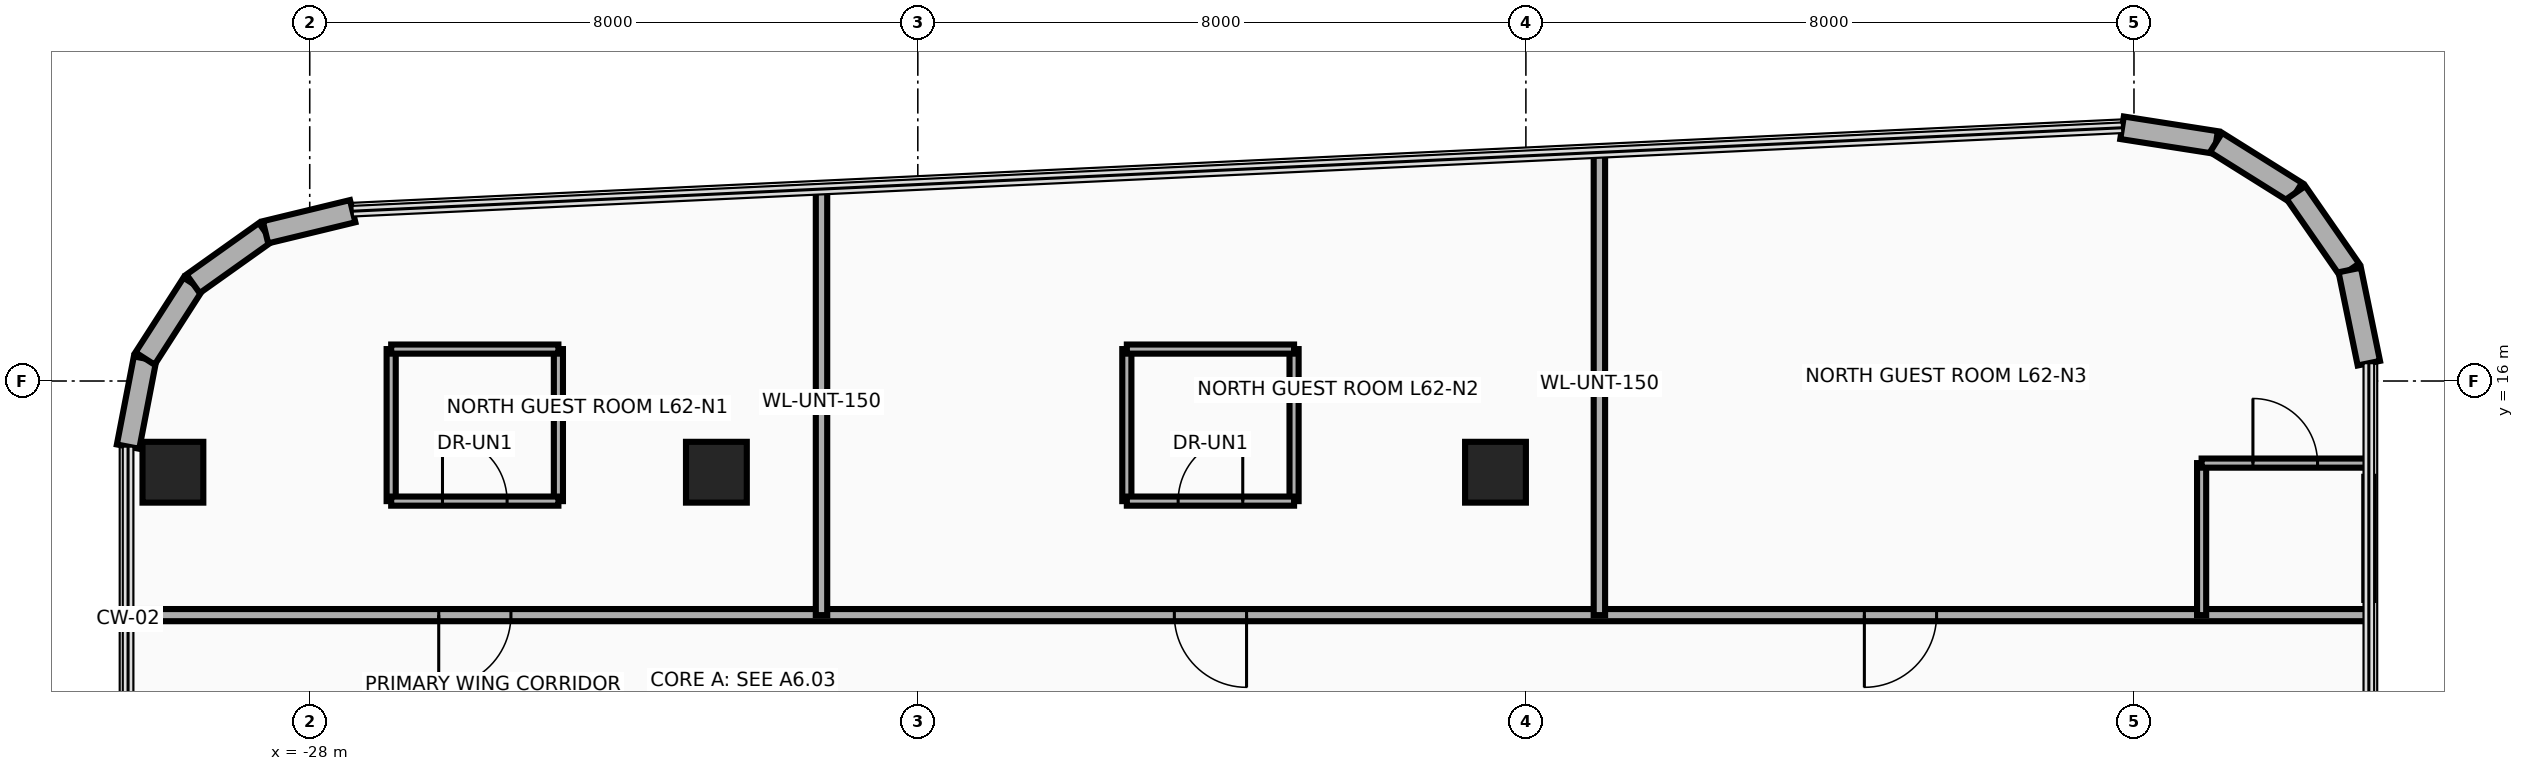
"""IFC4 building model, lengths in metres.
Left out: names, types, materials, properties, quantities, classifications, styles, units other than length and angle.
Written with IfcOpenShell. Run it as: python <this file> out.ifc"""

import sys

from ifc_helpers import new_model, si_unit, direction, frame, frame_2d, origin, origin_2d, place, context, subcontext, project, spatial, rectangle, extrude, source, transform, mapped, element, fill, save


model = new_model("IFC4")
c1 = context("Model", 3, precision=1e-05, world=origin(), true_north=direction((0.0, 1.0)))
c2 = subcontext(c1, "Body", "Model", "MODEL_VIEW")
j1 = project(units=[si_unit("LENGTHUNIT", "METRE"), si_unit("PLANEANGLEUNIT", "RADIAN")], contexts=[c1])
p1 = place(None, origin())
s1 = spatial("IfcSite", under=j1, at=p1, CompositionType="ELEMENT")
p2 = place(p1, origin())
s2 = spatial("IfcBuilding", under=s1, at=p2, CompositionType="ELEMENT")
p3 = place(p2, frame((0.0, 0.0, 240.5)))
s3 = spatial("IfcBuildingStorey", under=s2, at=p3, CompositionType="ELEMENT", Elevation=240.5)
m1 = source(origin(), c2, "Body", "SweptSolid", [
    extrude(rectangle(XDim=0.8, YDim=0.8, at=origin_2d()), origin(), (0.0, 0.0, 1.0), 3.5),
])
for number, where, z_axis, x_axis in (
    (1, (-29.8, 14.8, 0.0), (0.0, 0.0, 1.0), (1.0, 0.0, 0.0)),
    (2, (-22.65, 14.8, 0.0), (0.0, 0.0, 1.0), (1.0, 0.0, 0.0)),
    (3, (-12.4, 14.8, 0.0), (0.0, 0.0, 1.0), (1.0, 0.0, 0.0)),
):
    element("IfcColumn", number, at=place(p3, frame(where, z_axis=z_axis, x_axis=x_axis)), inside=s3, PredefinedType="COLUMN", context=c2, shape_type="MappedRepresentation", body=[
        mapped(m1, transform((0.0, 0.0, 0.0), x_axis=(1.0, 0.0, 0.0), y_axis=(0.0, 1.0, 0.0), z_axis=(0.0, 0.0, 1.0), scale=1.0)),
    ])
p4 = place(p3, frame((-30.39, 15.137, 0.0), z_axis=(0.0, 0.0, 1.0), x_axis=(0.189307792679, 0.981917796779, 0.0)))
e4 = element("IfcWall", 4, at=p4, inside=s3, PredefinedType="SOLIDWALL", context=c2, shape_type="SweptSolid", body=[
    extrude(rectangle(XDim=1.18, YDim=0.3, at=frame_2d((0.59, 0.0))), origin(), (0.0, 0.0, 1.0), 3.26),
])
p5 = place(p3, frame((-30.167, 16.295, 0.0), z_axis=(0.0, 0.0, 1.0), x_axis=(0.540842020947, 0.841124193195, 0.0)))
e5 = element("IfcWall", 5, at=p5, inside=s3, PredefinedType="SOLIDWALL", context=c2, shape_type="SweptSolid", body=[
    extrude(rectangle(XDim=1.169, YDim=0.3, at=frame_2d((0.584, 0.0))), origin(), (0.0, 0.0, 1.0), 3.26),
])
p6 = place(p3, frame((-29.534, 17.279, 0.0), z_axis=(0.0, 0.0, 1.0), x_axis=(0.81466371606, 0.579933642527, 0.0)))
e6 = element("IfcWall", 6, at=p6, inside=s3, PredefinedType="SOLIDWALL", context=c2, shape_type="SweptSolid", body=[
    extrude(rectangle(XDim=1.169, YDim=0.3, at=frame_2d((0.584, 0.0))), origin(), (0.0, 0.0, 1.0), 3.26),
])
p7 = place(p3, frame((-28.582, 17.957, 0.0), z_axis=(0.0, 0.0, 1.0), x_axis=(0.971929016595, 0.235274279725, 0.0)))
e7 = element("IfcWall", 7, at=p7, inside=s3, PredefinedType="SOLIDWALL", context=c2, shape_type="SweptSolid", body=[
    extrude(rectangle(XDim=1.18, YDim=0.3, at=frame_2d((0.59, 0.0))), origin(), (0.0, 0.0, 1.0), 3.26),
])
p8 = place(p3, frame((-4.157, 19.332, 0.0), z_axis=(0.0, 0.0, 1.0), x_axis=(0.987969236552, -0.15465053387, 0.0)))
e8 = element("IfcWall", 8, at=p8, inside=s3, PredefinedType="SOLIDWALL", context=c2, shape_type="SweptSolid", body=[
    extrude(rectangle(XDim=1.252, YDim=0.3, at=frame_2d((0.626, 0.0))), origin(), (0.0, 0.0, 1.0), 3.26),
])
for number, where, z_axis, x_axis in (
    (9, (-2.92, 19.138, 0.0), (0.0, 0.0, 1.0), (0.847, -0.531, 0.0)),
    (10, (-1.869, 18.48, 0.0), (0.0, 0.0, 1.0), (0.57, -0.822, 0.0)),
):
    element("IfcWall", number, at=place(p3, frame(where, z_axis=z_axis, x_axis=x_axis)), inside=s3, PredefinedType="SOLIDWALL", context=c2, shape_type="SweptSolid", body=[
        extrude(rectangle(XDim=1.24, YDim=0.3, at=frame_2d((0.62, 0.0))), origin(), (0.0, 0.0, 1.0), 3.26),
    ])
p9 = place(p3, frame((-1.161, 17.461, 0.0), z_axis=(0.0, 0.0, 1.0), x_axis=(0.20087696073, -0.979616479367, 0.0)))
e11 = element("IfcWall", 11, at=p9, inside=s3, PredefinedType="SOLIDWALL", context=c2, shape_type="SweptSolid", body=[
    extrude(rectangle(XDim=1.252, YDim=0.3, at=frame_2d((0.626, 0.0))), origin(), (0.0, 0.0, 1.0), 3.26),
])
p10 = place(p3, frame((-30.39, 12.92, 0.0), z_axis=(0.0, 0.0, 1.0), x_axis=(1.0, 0.0, 0.0)))
e12 = element("IfcWall", 12, at=p10, inside=s3, PredefinedType="PARTITIONING", context=c2, shape_type="SweptSolid", body=[
    extrude(rectangle(XDim=29.48, YDim=0.16, at=frame_2d((14.74, 0.0))), origin(), (0.0, 0.0, 1.0), 2.634),
])
p11 = place(p10, frame((4.087, 0.0, 0.0)))
e13 = element("IfcOpeningElement", 13, at=p11, cuts=e12, PredefinedType="OPENING", context=c2, shape_type="SweptSolid", body=[
    extrude(rectangle(XDim=0.95, YDim=2.15, at=frame_2d((0.475, 1.075))), frame((0.0, 0.095, 0.0), z_axis=(0.0, -1.0, 0.0), x_axis=(1.0, 0.0, 0.0)), (0.0, 0.0, 1.0), 0.19),
])
p12 = place(p10, frame((13.765, 0.0, 0.0)))
e14 = element("IfcOpeningElement", 14, at=p12, cuts=e12, PredefinedType="OPENING", context=c2, shape_type="SweptSolid", body=[
    extrude(rectangle(XDim=0.95, YDim=2.15, at=frame_2d((0.475, 1.075))), frame((0.0, 0.095, 0.0), z_axis=(0.0, -1.0, 0.0), x_axis=(1.0, 0.0, 0.0)), (0.0, 0.0, 1.0), 0.19),
])
p13 = place(p10, frame((22.843, 0.0, 0.0)))
e15 = element("IfcOpeningElement", 15, at=p13, cuts=e12, PredefinedType="OPENING", context=c2, shape_type="SweptSolid", body=[
    extrude(rectangle(XDim=0.95, YDim=2.15, at=frame_2d((0.475, 1.075))), frame((0.0, 0.095, 0.0), z_axis=(0.0, -1.0, 0.0), x_axis=(1.0, 0.0, 0.0)), (0.0, 0.0, 1.0), 0.19),
])
p14 = place(p3, frame((-21.267, 12.92, 0.0), z_axis=(0.0, 0.0, 1.0), x_axis=(0.0, 1.0, 0.0)))
e16 = element("IfcWall", 16, at=p14, inside=s3, PredefinedType="PARTITIONING", context=c2, shape_type="SweptSolid", body=[
    extrude(rectangle(XDim=5.605, YDim=0.15, at=frame_2d((2.803, 0.0))), origin(), (0.0, 0.0, 1.0), 2.544),
])
p15 = place(p3, frame((-11.033, 12.92, 0.0), z_axis=(0.0, 0.0, 1.0), x_axis=(0.0, 1.0, 0.0)))
e17 = element("IfcWall", 17, at=p15, inside=s3, PredefinedType="PARTITIONING", context=c2, shape_type="SweptSolid", body=[
    extrude(rectangle(XDim=6.088, YDim=0.15, at=frame_2d((3.044, 0.0))), origin(), (0.0, 0.0, 1.0), 3.26),
])
for number, where, z_axis, x_axis in (
    (18, (-26.928, 14.42, 0.0), (0.0, 0.0, 1.0), (0.0, 1.0, 0.0)),
    (19, (-24.729, 14.42, 0.0), (0.0, 0.0, 1.0), (0.0, 1.0, 0.0)),
):
    element("IfcWall", number, at=place(p3, frame(where, z_axis=z_axis, x_axis=x_axis)), inside=s3, PredefinedType="PARTITIONING", context=c2, shape_type="SweptSolid", body=[
        extrude(rectangle(XDim=2.0, YDim=0.12, at=frame_2d((1.0, 0.0))), origin(), (0.0, 0.0, 1.0), 2.544),
    ])
p16 = place(p3, frame((-26.928, 16.42, 0.0), z_axis=(0.0, 0.0, 1.0), x_axis=(1.0, 0.0, 0.0)))
e20 = element("IfcWall", 20, at=p16, inside=s3, PredefinedType="PARTITIONING", context=c2, shape_type="SweptSolid", body=[
    extrude(rectangle(XDim=2.2, YDim=0.12, at=frame_2d((1.1, 0.0))), origin(), (0.0, 0.0, 1.0), 3.26),
])
p17 = place(p3, frame((-26.928, 14.42, 0.0), z_axis=(0.0, 0.0, 1.0), x_axis=(1.0, 0.0, 0.0)))
e21 = element("IfcWall", 21, at=p17, inside=s3, PredefinedType="PARTITIONING", context=c2, shape_type="SweptSolid", body=[
    extrude(rectangle(XDim=2.2, YDim=0.12, at=frame_2d((1.1, 0.0))), origin(), (0.0, 0.0, 1.0), 3.26),
])
p18 = place(p17, frame((0.675, 0.0, 0.0)))
e22 = element("IfcOpeningElement", 22, at=p18, cuts=e21, PredefinedType="OPENING", context=c2, shape_type="SweptSolid", body=[
    extrude(rectangle(XDim=0.85, YDim=2.1, at=frame_2d((0.425, 1.05))), frame((0.0, 0.075, 0.0), z_axis=(0.0, -1.0, 0.0), x_axis=(1.0, 0.0, 0.0)), (0.0, 0.0, 1.0), 0.15),
])
for number, where, z_axis, x_axis in (
    (23, (-17.25, 14.42, 0.0), (0.0, 0.0, 1.0), (0.0, 1.0, 0.0)),
    (24, (-15.05, 14.42, 0.0), (0.0, 0.0, 1.0), (0.0, 1.0, 0.0)),
):
    element("IfcWall", number, at=place(p3, frame(where, z_axis=z_axis, x_axis=x_axis)), inside=s3, PredefinedType="PARTITIONING", context=c2, shape_type="SweptSolid", body=[
        extrude(rectangle(XDim=2.0, YDim=0.12, at=frame_2d((1.0, 0.0))), origin(), (0.0, 0.0, 1.0), 2.544),
    ])
p19 = place(p3, frame((-17.25, 16.42, 0.0), z_axis=(0.0, 0.0, 1.0), x_axis=(1.0, 0.0, 0.0)))
e25 = element("IfcWall", 25, at=p19, inside=s3, PredefinedType="PARTITIONING", context=c2, shape_type="SweptSolid", body=[
    extrude(rectangle(XDim=2.2, YDim=0.12, at=frame_2d((1.1, 0.0))), origin(), (0.0, 0.0, 1.0), 3.26),
])
p20 = place(p3, frame((-17.25, 14.42, 0.0), z_axis=(0.0, 0.0, 1.0), x_axis=(1.0, 0.0, 0.0)))
e26 = element("IfcWall", 26, at=p20, inside=s3, PredefinedType="PARTITIONING", context=c2, shape_type="SweptSolid", body=[
    extrude(rectangle(XDim=2.2, YDim=0.12, at=frame_2d((1.1, 0.0))), origin(), (0.0, 0.0, 1.0), 3.26),
])
p21 = place(p20, frame((0.675, 0.0, 0.0)))
e27 = element("IfcOpeningElement", 27, at=p21, cuts=e26, PredefinedType="OPENING", context=c2, shape_type="SweptSolid", body=[
    extrude(rectangle(XDim=0.85, YDim=2.1, at=frame_2d((0.425, 1.05))), frame((0.0, 0.075, 0.0), z_axis=(0.0, -1.0, 0.0), x_axis=(1.0, 0.0, 0.0)), (0.0, 0.0, 1.0), 0.15),
])
p22 = place(p3, frame((-3.11, 12.92, 0.0), z_axis=(0.0, 0.0, 1.0), x_axis=(0.0, 1.0, 0.0)))
e28 = element("IfcWall", 28, at=p22, inside=s3, PredefinedType="PARTITIONING", context=c2, shape_type="SweptSolid", body=[
    extrude(rectangle(XDim=2.0, YDim=0.12, at=frame_2d((1.0, 0.0))), origin(), (0.0, 0.0, 1.0), 3.26),
])
p23 = place(p3, frame((-3.11, 14.92, 0.0), z_axis=(0.0, 0.0, 1.0), x_axis=(1.0, 0.0, 0.0)))
e29 = element("IfcWall", 29, at=p23, inside=s3, PredefinedType="PARTITIONING", context=c2, shape_type="SweptSolid", body=[
    extrude(rectangle(XDim=2.2, YDim=0.12, at=frame_2d((1.1, 0.0))), origin(), (0.0, 0.0, 1.0), 3.26),
])
p24 = place(p23, frame((0.675, 0.0, 0.0)))
e30 = element("IfcOpeningElement", 30, at=p24, cuts=e29, PredefinedType="OPENING", context=c2, shape_type="SweptSolid", body=[
    extrude(rectangle(XDim=0.85, YDim=2.1, at=frame_2d((0.425, 1.05))), frame((0.0, 0.075, 0.0), z_axis=(0.0, -1.0, 0.0), x_axis=(1.0, 0.0, 0.0)), (0.0, 0.0, 1.0), 0.15),
])
p25 = place(p3, frame((-0.91, 13.12, 0.0), z_axis=(0.0, 0.0, 1.0), x_axis=(0.0, 1.0, 0.0)))
e31 = element("IfcWall", 31, at=p25, inside=s3, PredefinedType="PARTITIONING", context=c2, shape_type="SweptSolid", body=[
    extrude(rectangle(XDim=1.62, YDim=0.12, at=frame_2d((0.81, 0.0))), origin(), (0.0, 0.0, 1.0), 3.26),
])
p26 = place(p11, frame((0.95, 0.0, 0.0), z_axis=(0.0, 0.0, 1.0), x_axis=(-1.0, 0.0, 0.0)))
e32 = element("IfcDoor", 32, at=p26, inside=s3, OperationType="SINGLE_SWING_LEFT", PredefinedType="DOOR", context=c2, shape_type="SweptSolid", body=[
    extrude(rectangle(XDim=0.95, YDim=2.15, at=frame_2d((0.475, 1.075))), frame((0.0, 0.025, 0.0), z_axis=(0.0, -1.0, 0.0), x_axis=(1.0, 0.0, 0.0)), (0.0, 0.0, 1.0), 0.05),
])
fill(e13, e32)
p27 = place(p18, origin())
e33 = element("IfcDoor", 33, at=p27, inside=s3, OperationType="SINGLE_SWING_RIGHT", PredefinedType="DOOR", context=c2, shape_type="SweptSolid", body=[
    extrude(rectangle(XDim=0.85, YDim=2.1, at=frame_2d((0.425, 1.05))), frame((0.0, 0.025, 0.0), z_axis=(0.0, -1.0, 0.0), x_axis=(1.0, 0.0, 0.0)), (0.0, 0.0, 1.0), 0.05),
])
fill(e22, e33)
p28 = place(p12, frame((0.95, 0.0, 0.0), z_axis=(0.0, 0.0, 1.0), x_axis=(-1.0, 0.0, 0.0)))
e34 = element("IfcDoor", 34, at=p28, inside=s3, OperationType="SINGLE_SWING_LEFT", PredefinedType="DOOR", context=c2, shape_type="SweptSolid", body=[
    extrude(rectangle(XDim=0.95, YDim=2.15, at=frame_2d((0.475, 1.075))), frame((0.0, 0.025, 0.0), z_axis=(0.0, -1.0, 0.0), x_axis=(1.0, 0.0, 0.0)), (0.0, 0.0, 1.0), 0.05),
])
fill(e14, e34)
p29 = place(p21, origin())
e35 = element("IfcDoor", 35, at=p29, inside=s3, OperationType="SINGLE_SWING_RIGHT", PredefinedType="DOOR", context=c2, shape_type="SweptSolid", body=[
    extrude(rectangle(XDim=0.85, YDim=2.1, at=frame_2d((0.425, 1.05))), frame((0.0, 0.025, 0.0), z_axis=(0.0, -1.0, 0.0), x_axis=(1.0, 0.0, 0.0)), (0.0, 0.0, 1.0), 0.05),
])
fill(e27, e35)
p30 = place(p13, frame((0.95, 0.0, 0.0), z_axis=(0.0, 0.0, 1.0), x_axis=(-1.0, 0.0, 0.0)))
e36 = element("IfcDoor", 36, at=p30, inside=s3, OperationType="SINGLE_SWING_LEFT", PredefinedType="DOOR", context=c2, shape_type="SweptSolid", body=[
    extrude(rectangle(XDim=0.95, YDim=2.15, at=frame_2d((0.475, 1.075))), frame((0.0, 0.025, 0.0), z_axis=(0.0, -1.0, 0.0), x_axis=(1.0, 0.0, 0.0)), (0.0, 0.0, 1.0), 0.05),
])
fill(e15, e36)
p31 = place(p24, origin())
e37 = element("IfcDoor", 37, at=p31, inside=s3, OperationType="SINGLE_SWING_RIGHT", PredefinedType="DOOR", context=c2, shape_type="SweptSolid", body=[
    extrude(rectangle(XDim=0.85, YDim=2.1, at=frame_2d((0.425, 1.05))), frame((0.0, 0.025, 0.0), z_axis=(0.0, -1.0, 0.0), x_axis=(1.0, 0.0, 0.0)), (0.0, 0.0, 1.0), 0.05),
])
fill(e30, e37)
save(model, sys.argv[1])
